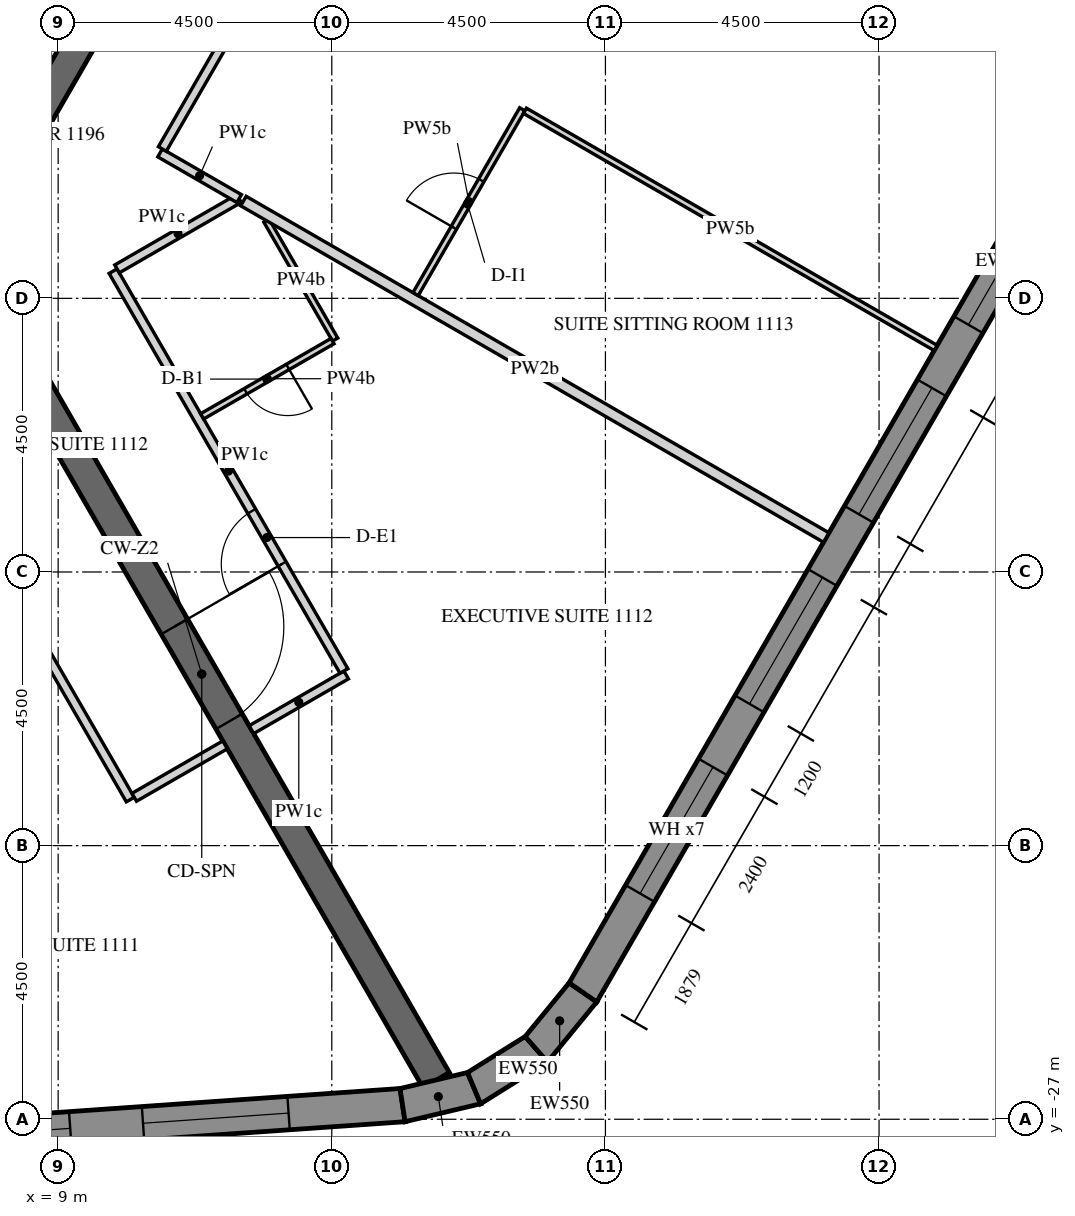
"""IFC4 building model, lengths in metres.
Left out: names, types, materials, properties, quantities, classifications, styles, units other than length and angle.
Written with IfcOpenShell. Run it as: python <this file> out.ifc"""

import sys

from ifc_helpers import new_model, si_unit, direction, frame, frame_2d, origin, place, context, subcontext, project, spatial, polyline, rectangle, outline, extrude, element, fill, save


model = new_model("IFC4")
c1 = context("Model", 3, precision=1e-05, world=origin(), true_north=direction((0.0, 1.0)))
c2 = subcontext(c1, "Body", "Model", "MODEL_VIEW")
j1 = project(units=[si_unit("LENGTHUNIT", "METRE"), si_unit("PLANEANGLEUNIT", "RADIAN")], contexts=[c1])
p1 = place(None, origin())
s1 = spatial("IfcSite", under=j1, at=p1, CompositionType="ELEMENT")
p2 = place(p1, origin())
s2 = spatial("IfcBuilding", under=s1, at=p2, CompositionType="ELEMENT")
p3 = place(p2, frame((0.0, 0.0, 156.6)))
s3 = spatial("IfcBuildingStorey", under=s2, at=p3, CompositionType="ELEMENT", Elevation=156.6)
p4 = place(p3, frame((-13.026, -28.704, -0.15), z_axis=(0.0, 0.0, 1.0), x_axis=(0.99756406806, 0.069756219185, 0.0)))
e1 = element("IfcWall", 1, at=p4, inside=s3, PredefinedType="SOLIDWALL", context=c2, shape_type="SweptSolid", body=[
    extrude(outline(polyline([(-0.026, -0.275), (27.78, -0.275), (27.735, 0.275), (0.026, 0.275), (-0.026, -0.275)])), origin(), (0.0, 0.0, 1.0), 3.9),
])
p5 = place(p4, frame((1.879, 0.0, 1.05)))
e2 = element("IfcOpeningElement", 2, at=p5, cuts=e1, PredefinedType="OPENING", context=c2, shape_type="SweptSolid", body=[
    extrude(rectangle(XDim=2.4, YDim=2.4, at=frame_2d((1.2, 1.2))), frame((0.0, 0.285, 0.0), z_axis=(0.0, -1.0, 0.0), x_axis=(1.0, 0.0, 0.0)), (0.0, 0.0, 1.0), 0.57),
])
p6 = place(p4, frame((5.479, 0.0, 1.05)))
e3 = element("IfcOpeningElement", 3, at=p6, cuts=e1, PredefinedType="OPENING", context=c2, shape_type="SweptSolid", body=[
    extrude(rectangle(XDim=2.4, YDim=2.4, at=frame_2d((1.2, 1.2))), frame((0.0, 0.285, 0.0), z_axis=(0.0, -1.0, 0.0), x_axis=(1.0, 0.0, 0.0)), (0.0, 0.0, 1.0), 0.57),
])
p7 = place(p4, frame((9.079, 0.0, 1.05)))
e4 = element("IfcOpeningElement", 4, at=p7, cuts=e1, PredefinedType="OPENING", context=c2, shape_type="SweptSolid", body=[
    extrude(rectangle(XDim=2.4, YDim=2.4, at=frame_2d((1.2, 1.2))), frame((0.0, 0.285, 0.0), z_axis=(0.0, -1.0, 0.0), x_axis=(1.0, 0.0, 0.0)), (0.0, 0.0, 1.0), 0.57),
])
p8 = place(p4, frame((12.679, 0.0, 1.05)))
e5 = element("IfcOpeningElement", 5, at=p8, cuts=e1, PredefinedType="OPENING", context=c2, shape_type="SweptSolid", body=[
    extrude(rectangle(XDim=2.4, YDim=2.4, at=frame_2d((1.2, 1.2))), frame((0.0, 0.285, 0.0), z_axis=(0.0, -1.0, 0.0), x_axis=(1.0, 0.0, 0.0)), (0.0, 0.0, 1.0), 0.57),
])
p9 = place(p4, frame((16.279, 0.0, 1.05)))
e6 = element("IfcOpeningElement", 6, at=p9, cuts=e1, PredefinedType="OPENING", context=c2, shape_type="SweptSolid", body=[
    extrude(rectangle(XDim=2.4, YDim=2.4, at=frame_2d((1.2, 1.2))), frame((0.0, 0.285, 0.0), z_axis=(0.0, -1.0, 0.0), x_axis=(1.0, 0.0, 0.0)), (0.0, 0.0, 1.0), 0.57),
])
p10 = place(p4, frame((19.879, 0.0, 1.05)))
e7 = element("IfcOpeningElement", 7, at=p10, cuts=e1, PredefinedType="OPENING", context=c2, shape_type="SweptSolid", body=[
    extrude(rectangle(XDim=2.4, YDim=2.4, at=frame_2d((1.2, 1.2))), frame((0.0, 0.285, 0.0), z_axis=(0.0, -1.0, 0.0), x_axis=(1.0, 0.0, 0.0)), (0.0, 0.0, 1.0), 0.57),
])
p11 = place(p4, frame((23.479, 0.0, 1.05)))
e8 = element("IfcOpeningElement", 8, at=p11, cuts=e1, PredefinedType="OPENING", context=c2, shape_type="SweptSolid", body=[
    extrude(rectangle(XDim=2.4, YDim=2.4, at=frame_2d((1.2, 1.2))), frame((0.0, 0.285, 0.0), z_axis=(0.0, -1.0, 0.0), x_axis=(1.0, 0.0, 0.0)), (0.0, 0.0, 1.0), 0.57),
])
p12 = place(p3, frame((14.664, -26.767, -0.15), z_axis=(0.0, 0.0, 1.0), x_axis=(0.973063591128, 0.230536868247, 0.0)))
e9 = element("IfcWall", 9, at=p12, inside=s3, PredefinedType="SOLIDWALL", context=c2, shape_type="SweptSolid", body=[
    extrude(outline(polyline([(-0.022, -0.275), (1.253, -0.275), (1.163, 0.275), (0.022, 0.275), (-0.022, -0.275)])), origin(), (0.0, 0.0, 1.0), 3.9),
])
p13 = place(p3, frame((15.84, -26.489, -0.15), z_axis=(0.0, 0.0, 1.0), x_axis=(0.848009655012, 0.52998077796, 0.0)))
e10 = element("IfcWall", 10, at=p13, inside=s3, PredefinedType="SOLIDWALL", context=c2, shape_type="SweptSolid", body=[
    extrude(outline(polyline([(-0.045, -0.275), (1.253, -0.275), (1.163, 0.275), (0.045, 0.275), (-0.045, -0.275)])), origin(), (0.0, 0.0, 1.0), 3.9),
])
p14 = place(p3, frame((16.864, -25.848, -0.15), z_axis=(0.0, 0.0, 1.0), x_axis=(0.633842757806, 0.773461930787, 0.0)))
e11 = element("IfcWall", 11, at=p14, inside=s3, PredefinedType="SOLIDWALL", context=c2, shape_type="SweptSolid", body=[
    extrude(outline(polyline([(-0.045, -0.275), (1.231, -0.275), (1.186, 0.275), (0.045, 0.275), (-0.045, -0.275)])), origin(), (0.0, 0.0, 1.0), 3.9),
])
p15 = place(p3, frame((17.63, -24.914, -0.15), z_axis=(0.0, 0.0, 1.0), x_axis=(0.499998569178, 0.866026229868, 0.0)))
e12 = element("IfcWall", 12, at=p15, inside=s3, PredefinedType="SOLIDWALL", context=c2, shape_type="SweptSolid", body=[
    extrude(outline(polyline([(-0.022, -0.275), (27.783, -0.275), (27.732, 0.275), (0.022, 0.275), (-0.022, -0.275)])), origin(), (0.0, 0.0, 1.0), 3.9),
])
p16 = place(p15, frame((1.879, 0.0, 1.05)))
e13 = element("IfcOpeningElement", 13, at=p16, cuts=e12, PredefinedType="OPENING", context=c2, shape_type="SweptSolid", body=[
    extrude(rectangle(XDim=2.4, YDim=2.4, at=frame_2d((1.2, 1.2))), frame((0.0, 0.285, 0.0), z_axis=(0.0, -1.0, 0.0), x_axis=(1.0, 0.0, 0.0)), (0.0, 0.0, 1.0), 0.57),
])
p17 = place(p15, frame((5.479, 0.0, 1.05)))
e14 = element("IfcOpeningElement", 14, at=p17, cuts=e12, PredefinedType="OPENING", context=c2, shape_type="SweptSolid", body=[
    extrude(rectangle(XDim=2.4, YDim=2.4, at=frame_2d((1.2, 1.2))), frame((0.0, 0.285, 0.0), z_axis=(0.0, -1.0, 0.0), x_axis=(1.0, 0.0, 0.0)), (0.0, 0.0, 1.0), 0.57),
])
p18 = place(p15, frame((9.079, 0.0, 1.05)))
e15 = element("IfcOpeningElement", 15, at=p18, cuts=e12, PredefinedType="OPENING", context=c2, shape_type="SweptSolid", body=[
    extrude(rectangle(XDim=2.4, YDim=2.4, at=frame_2d((1.2, 1.2))), frame((0.0, 0.285, 0.0), z_axis=(0.0, -1.0, 0.0), x_axis=(1.0, 0.0, 0.0)), (0.0, 0.0, 1.0), 0.57),
])
p19 = place(p15, frame((12.679, 0.0, 1.05)))
e16 = element("IfcOpeningElement", 16, at=p19, cuts=e12, PredefinedType="OPENING", context=c2, shape_type="SweptSolid", body=[
    extrude(rectangle(XDim=2.4, YDim=2.4, at=frame_2d((1.2, 1.2))), frame((0.0, 0.285, 0.0), z_axis=(0.0, -1.0, 0.0), x_axis=(1.0, 0.0, 0.0)), (0.0, 0.0, 1.0), 0.57),
])
p20 = place(p15, frame((16.279, 0.0, 1.05)))
e17 = element("IfcOpeningElement", 17, at=p20, cuts=e12, PredefinedType="OPENING", context=c2, shape_type="SweptSolid", body=[
    extrude(rectangle(XDim=2.4, YDim=2.4, at=frame_2d((1.2, 1.2))), frame((0.0, 0.285, 0.0), z_axis=(0.0, -1.0, 0.0), x_axis=(1.0, 0.0, 0.0)), (0.0, 0.0, 1.0), 0.57),
])
p21 = place(p15, frame((19.879, 0.0, 1.05)))
e18 = element("IfcOpeningElement", 18, at=p21, cuts=e12, PredefinedType="OPENING", context=c2, shape_type="SweptSolid", body=[
    extrude(rectangle(XDim=2.4, YDim=2.4, at=frame_2d((1.2, 1.2))), frame((0.0, 0.285, 0.0), z_axis=(0.0, -1.0, 0.0), x_axis=(1.0, 0.0, 0.0)), (0.0, 0.0, 1.0), 0.57),
])
p22 = place(p15, frame((23.479, 0.0, 1.05)))
e19 = element("IfcOpeningElement", 19, at=p22, cuts=e12, PredefinedType="OPENING", context=c2, shape_type="SweptSolid", body=[
    extrude(rectangle(XDim=2.4, YDim=2.4, at=frame_2d((1.2, 1.2))), frame((0.0, 0.285, 0.0), z_axis=(0.0, -1.0, 0.0), x_axis=(1.0, 0.0, 0.0)), (0.0, 0.0, 1.0), 0.57),
])
p23 = place(p3, frame((7.361, -12.75, -0.15), z_axis=(0.0, 0.0, 1.0), x_axis=(0.50000571537, 0.866022103989, 0.0)))
e20 = element("IfcWall", 20, at=p23, inside=s3, PredefinedType="SHEAR", context=c2, shape_type="SweptSolid", body=[
    extrude(outline(polyline([(-0.144, -0.25), (14.867, -0.25), (14.578, 0.25), (0.144, 0.25), (-0.144, -0.25)])), origin(), (0.0, 0.0, 1.0), 3.9),
])
p24 = place(p23, frame((6.49, 0.0, 0.15)))
e21 = element("IfcOpeningElement", 21, at=p24, cuts=e20, PredefinedType="OPENING", context=c2, shape_type="SweptSolid", body=[
    extrude(rectangle(XDim=1.8, YDim=2.4, at=frame_2d((0.9, 1.2))), frame((0.0, 0.26, 0.0), z_axis=(0.0, -1.0, 0.0), x_axis=(1.0, 0.0, 0.0)), (0.0, 0.0, 1.0), 0.52),
])
p25 = place(p3, frame((7.506, -13.0, -0.15), z_axis=(0.0, 0.0, 1.0), x_axis=(0.499988271576, -0.866032175087, 0.0)))
e22 = element("IfcWall", 22, at=p25, inside=s3, PredefinedType="SHEAR", context=c2, shape_type="SweptSolid", body=[
    extrude(rectangle(XDim=15.424, YDim=0.5, at=frame_2d((7.712, 0.0))), origin(), (0.0, 0.0, 1.0), 3.9),
])
p26 = place(p25, frame((6.812, 0.0, 0.15)))
e23 = element("IfcOpeningElement", 23, at=p26, cuts=e22, PredefinedType="OPENING", context=c2, shape_type="SweptSolid", body=[
    extrude(rectangle(XDim=1.8, YDim=2.4, at=frame_2d((0.9, 1.2))), frame((0.0, 0.26, 0.0), z_axis=(0.0, -1.0, 0.0), x_axis=(1.0, 0.0, 0.0)), (0.0, 0.0, 1.0), 0.52),
])
p27 = place(p3, frame((5.673, -9.825, -0.15), z_axis=(0.0, 0.0, 1.0), x_axis=(0.499995046907, 0.866028263435, 0.0)))
e24 = element("IfcWall", 24, at=p27, inside=s3, PredefinedType="SHEAR", context=c2, shape_type="SweptSolid", body=[
    extrude(outline(polyline([(-0.101, -0.175), (11.446, -0.175), (11.244, 0.175), (0.101, 0.175), (-0.101, -0.175)])), origin(), (0.0, 0.0, 1.0), 3.9),
])
p28 = place(p27, frame((4.801, 0.0, 0.15)))
e25 = element("IfcOpeningElement", 25, at=p28, cuts=e24, PredefinedType="OPENING", context=c2, shape_type="SweptSolid", body=[
    extrude(rectangle(XDim=1.8, YDim=2.4, at=frame_2d((0.9, 1.2))), frame((0.0, 0.185, 0.0), z_axis=(0.0, -1.0, 0.0), x_axis=(1.0, 0.0, 0.0)), (0.0, 0.0, 1.0), 0.37),
])
p29 = place(p3, frame((6.178, -14.8, 0.0), z_axis=(0.0, 0.0, 1.0), x_axis=(0.499984309814, -0.866034462328, 0.0)))
e26 = element("IfcWall", 26, at=p29, inside=s3, PredefinedType="PARTITIONING", context=c2, shape_type="SweptSolid", body=[
    extrude(rectangle(XDim=8.017, YDim=0.15, at=frame_2d((4.008, 0.0))), origin(), (0.0, 0.0, 1.0), 2.823),
])
p30 = place(p3, frame((10.251, -21.705, 0.0), z_axis=(0.0, 0.0, 1.0), x_axis=(0.866013532718, 0.500020560727, 0.0)))
e27 = element("IfcWall", 27, at=p30, inside=s3, PredefinedType="PARTITIONING", context=c2, shape_type="SweptSolid", body=[
    extrude(rectangle(XDim=1.725, YDim=0.15, at=frame_2d((0.863, 0.0))), origin(), (0.0, 0.0, 1.0), 2.823),
])
p31 = place(p3, frame((12.178, -20.593, 0.0), z_axis=(0.0, 0.0, 1.0), x_axis=(0.866047807691, 0.499961193289, 0.0)))
e28 = element("IfcWall", 28, at=p31, inside=s3, PredefinedType="PARTITIONING", context=c2, shape_type="SweptSolid", body=[
    extrude(rectangle(XDim=1.8, YDim=0.15, at=frame_2d((0.9, 0.0))), origin(), (0.0, 0.0, 1.0), 2.823),
])
p32 = place(p3, frame((13.699, -19.628, 0.0), z_axis=(0.0, 0.0, 1.0), x_axis=(-0.499998968938, 0.866025999068, 0.0)))
e29 = element("IfcWall", 29, at=p32, inside=s3, PredefinedType="PARTITIONING", context=c2, shape_type="SweptSolid", body=[
    extrude(rectangle(XDim=7.592, YDim=0.15, at=frame_2d((3.796, 0.0))), origin(), (0.0, 0.0, 1.0), 2.823),
])
p33 = place(p32, frame((2.033, 0.0, 0.0)))
e30 = element("IfcOpeningElement", 30, at=p33, cuts=e29, PredefinedType="OPENING", context=c2, shape_type="SweptSolid", body=[
    extrude(rectangle(XDim=1.0, YDim=2.1, at=frame_2d((0.5, 1.05))), frame((0.0, 0.085, 0.0), z_axis=(0.0, -1.0, 0.0), x_axis=(1.0, 0.0, 0.0)), (0.0, 0.0, 1.0), 0.17),
])
p34 = place(p3, frame((9.968, -13.016, 0.0), z_axis=(0.0, 0.0, 1.0), x_axis=(0.866022320763, 0.500005339912, 0.0)))
e31 = element("IfcWall", 31, at=p34, inside=s3, PredefinedType="PARTITIONING", context=c2, shape_type="SweptSolid", body=[
    extrude(rectangle(XDim=2.316, YDim=0.15, at=frame_2d((1.158, 0.0))), origin(), (0.0, 0.0, 1.0), 2.823),
])
p35 = place(p3, frame((11.977, -11.859, 0.0), z_axis=(0.0, 0.0, 1.0), x_axis=(-0.865993364801, 0.500055489042, 0.0)))
e32 = element("IfcWall", 32, at=p35, inside=s3, PredefinedType="PARTITIONING", context=c2, shape_type="SweptSolid", body=[
    extrude(rectangle(XDim=1.502, YDim=0.15, at=frame_2d((0.751, 0.0))), origin(), (0.0, 0.0, 1.0), 2.823),
])
p36 = place(p3, frame((10.714, -11.043, 0.0), z_axis=(0.0, 0.0, 1.0), x_axis=(0.500001980452, 0.866024260367, 0.0)))
e33 = element("IfcWall", 33, at=p36, inside=s3, PredefinedType="PARTITIONING", context=c2, shape_type="SweptSolid", body=[
    extrude(rectangle(XDim=12.752, YDim=0.15, at=frame_2d((6.376, 0.0))), origin(), (0.0, 0.0, 1.0), 2.823),
])
p37 = place(p36, frame((3.625, 0.0, 0.0)))
e34 = element("IfcOpeningElement", 34, at=p37, cuts=e33, PredefinedType="OPENING", context=c2, shape_type="SweptSolid", body=[
    extrude(rectangle(XDim=1.0, YDim=2.1, at=frame_2d((0.5, 1.05))), frame((0.0, 0.085, 0.0), z_axis=(0.0, -1.0, 0.0), x_axis=(1.0, 0.0, 0.0)), (0.0, 0.0, 1.0), 0.17),
])
p38 = place(p36, frame((11.602, 0.0, 0.0)))
e35 = element("IfcOpeningElement", 35, at=p38, cuts=e33, PredefinedType="OPENING", context=c2, shape_type="SweptSolid", body=[
    extrude(rectangle(XDim=1.0, YDim=2.1, at=frame_2d((0.5, 1.05))), frame((0.0, 0.085, 0.0), z_axis=(0.0, -1.0, 0.0), x_axis=(1.0, 0.0, 0.0)), (0.0, 0.0, 1.0), 0.17),
])
p39 = place(p3, frame((12.426, -12.223, 0.0), z_axis=(0.0, 0.0, 1.0), x_axis=(0.499919032186, -0.866072145528, 0.0)))
e36 = element("IfcWall", 36, at=p39, inside=s3, PredefinedType="PARTITIONING", context=c2, shape_type="SweptSolid", body=[
    extrude(rectangle(XDim=2.258, YDim=0.1, at=frame_2d((1.129, 0.0))), origin(), (0.0, 0.0, 1.0), 2.823),
])
p40 = place(p3, frame((13.512, -14.203, 0.0), z_axis=(0.0, 0.0, 1.0), x_axis=(-0.866006523861, -0.500032699561, 0.0)))
e37 = element("IfcWall", 37, at=p40, inside=s3, PredefinedType="PARTITIONING", context=c2, shape_type="SweptSolid", body=[
    extrude(rectangle(XDim=2.475, YDim=0.1, at=frame_2d((1.237, 0.0))), origin(), (0.0, 0.0, 1.0), 2.823),
])
p41 = place(p40, frame((0.85, 0.0, 0.0)))
e38 = element("IfcOpeningElement", 38, at=p41, cuts=e37, PredefinedType="OPENING", context=c2, shape_type="SweptSolid", body=[
    extrude(rectangle(XDim=0.8, YDim=2.1, at=frame_2d((0.4, 1.05))), frame((0.0, 0.06, 0.0), z_axis=(0.0, -1.0, 0.0), x_axis=(1.0, 0.0, 0.0)), (0.0, 0.0, 1.0), 0.12),
])
p42 = place(p3, frame((21.631, -17.433, 0.0), z_axis=(0.0, 0.0, 1.0), x_axis=(-0.866031296205, 0.499989793889, 0.0)))
e39 = element("IfcWall", 39, at=p42, inside=s3, PredefinedType="PARTITIONING", context=c2, shape_type="SweptSolid", body=[
    extrude(rectangle(XDim=11.067, YDim=0.18, at=frame_2d((5.534, 0.0))), origin(), (0.0, 0.0, 1.0), 2.823),
])
p43 = place(p3, frame((14.878, -13.43, 0.0), z_axis=(0.0, 0.0, 1.0), x_axis=(0.500021481416, 0.866013001128, 0.0)))
e40 = element("IfcWall", 40, at=p43, inside=s3, PredefinedType="PARTITIONING", context=c2, shape_type="SweptSolid", body=[
    extrude(rectangle(XDim=3.51, YDim=0.1, at=frame_2d((1.755, 0.0))), origin(), (0.0, 0.0, 1.0), 2.823),
])
p44 = place(p43, frame((1.26, 0.0, 0.0)))
e41 = element("IfcOpeningElement", 41, at=p44, cuts=e40, PredefinedType="OPENING", context=c2, shape_type="SweptSolid", body=[
    extrude(rectangle(XDim=0.9, YDim=2.1, at=frame_2d((0.45, 1.05))), frame((0.0, 0.06, 0.0), z_axis=(0.0, -1.0, 0.0), x_axis=(1.0, 0.0, 0.0)), (0.0, 0.0, 1.0), 0.12),
])
p45 = place(p3, frame((16.676, -10.416, 0.0), z_axis=(0.0, 0.0, 1.0), x_axis=(0.866034953203, -0.499983459557, 0.0)))
e42 = element("IfcWall", 42, at=p45, inside=s3, PredefinedType="PARTITIONING", context=c2, shape_type="SweptSolid", body=[
    extrude(rectangle(XDim=7.8, YDim=0.1, at=frame_2d((3.9, 0.0))), origin(), (0.0, 0.0, 1.0), 2.823),
])
p46 = place(p10, frame((0.0, 0.205, 0.0)))
e43 = element("IfcWindow", 43, at=p46, inside=s3, PartitioningType="DOUBLE_PANEL_VERTICAL", PredefinedType="WINDOW", context=c2, shape_type="SweptSolid", body=[
    extrude(rectangle(XDim=2.4, YDim=2.4, at=frame_2d((1.2, 1.2))), frame((0.0, 0.03, 0.0), z_axis=(0.0, -1.0, 0.0), x_axis=(1.0, 0.0, 0.0)), (0.0, 0.0, 1.0), 0.06),
])
fill(e7, e43)
p47 = place(p11, frame((0.0, 0.205, 0.0)))
e44 = element("IfcWindow", 44, at=p47, inside=s3, PartitioningType="DOUBLE_PANEL_VERTICAL", PredefinedType="WINDOW", context=c2, shape_type="SweptSolid", body=[
    extrude(rectangle(XDim=2.4, YDim=2.4, at=frame_2d((1.2, 1.2))), frame((0.0, 0.03, 0.0), z_axis=(0.0, -1.0, 0.0), x_axis=(1.0, 0.0, 0.0)), (0.0, 0.0, 1.0), 0.06),
])
fill(e8, e44)
p48 = place(p16, frame((0.0, 0.205, 0.0)))
e45 = element("IfcWindow", 45, at=p48, inside=s3, PartitioningType="DOUBLE_PANEL_VERTICAL", PredefinedType="WINDOW", context=c2, shape_type="SweptSolid", body=[
    extrude(rectangle(XDim=2.4, YDim=2.4, at=frame_2d((1.2, 1.2))), frame((0.0, 0.03, 0.0), z_axis=(0.0, -1.0, 0.0), x_axis=(1.0, 0.0, 0.0)), (0.0, 0.0, 1.0), 0.06),
])
fill(e13, e45)
p49 = place(p17, frame((0.0, 0.205, 0.0)))
e46 = element("IfcWindow", 46, at=p49, inside=s3, PartitioningType="DOUBLE_PANEL_VERTICAL", PredefinedType="WINDOW", context=c2, shape_type="SweptSolid", body=[
    extrude(rectangle(XDim=2.4, YDim=2.4, at=frame_2d((1.2, 1.2))), frame((0.0, 0.03, 0.0), z_axis=(0.0, -1.0, 0.0), x_axis=(1.0, 0.0, 0.0)), (0.0, 0.0, 1.0), 0.06),
])
fill(e14, e46)
p50 = place(p18, frame((0.0, 0.205, 0.0)))
e47 = element("IfcWindow", 47, at=p50, inside=s3, PartitioningType="DOUBLE_PANEL_VERTICAL", PredefinedType="WINDOW", context=c2, shape_type="SweptSolid", body=[
    extrude(rectangle(XDim=2.4, YDim=2.4, at=frame_2d((1.2, 1.2))), frame((0.0, 0.03, 0.0), z_axis=(0.0, -1.0, 0.0), x_axis=(1.0, 0.0, 0.0)), (0.0, 0.0, 1.0), 0.06),
])
fill(e15, e47)
p51 = place(p19, frame((0.0, 0.205, 0.0)))
e48 = element("IfcWindow", 48, at=p51, inside=s3, PartitioningType="DOUBLE_PANEL_VERTICAL", PredefinedType="WINDOW", context=c2, shape_type="SweptSolid", body=[
    extrude(rectangle(XDim=2.4, YDim=2.4, at=frame_2d((1.2, 1.2))), frame((0.0, 0.03, 0.0), z_axis=(0.0, -1.0, 0.0), x_axis=(1.0, 0.0, 0.0)), (0.0, 0.0, 1.0), 0.06),
])
fill(e16, e48)
p52 = place(p26, origin())
e49 = element("IfcDoor", 49, at=p52, inside=s3, OperationType="DOUBLE_DOOR_SINGLE_SWING", PredefinedType="DOOR", context=c2, shape_type="SweptSolid", body=[
    extrude(rectangle(XDim=1.8, YDim=2.4, at=frame_2d((0.9, 1.2))), frame((0.0, 0.025, 0.0), z_axis=(0.0, -1.0, 0.0), x_axis=(1.0, 0.0, 0.0)), (0.0, 0.0, 1.0), 0.05),
])
fill(e23, e49)
p53 = place(p33, origin())
e50 = element("IfcDoor", 50, at=p53, inside=s3, OperationType="SINGLE_SWING_LEFT", PredefinedType="DOOR", context=c2, shape_type="SweptSolid", body=[
    extrude(rectangle(XDim=1.0, YDim=2.1, at=frame_2d((0.5, 1.05))), frame((0.0, 0.025, 0.0), z_axis=(0.0, -1.0, 0.0), x_axis=(1.0, 0.0, 0.0)), (0.0, 0.0, 1.0), 0.05),
])
fill(e30, e50)
p54 = place(p41, origin())
e51 = element("IfcDoor", 51, at=p54, inside=s3, OperationType="SINGLE_SWING_RIGHT", PredefinedType="DOOR", context=c2, shape_type="SweptSolid", body=[
    extrude(rectangle(XDim=0.8, YDim=2.1, at=frame_2d((0.4, 1.05))), frame((0.0, 0.025, 0.0), z_axis=(0.0, -1.0, 0.0), x_axis=(1.0, 0.0, 0.0)), (0.0, 0.0, 1.0), 0.05),
])
fill(e38, e51)
p55 = place(p44, origin())
e52 = element("IfcDoor", 52, at=p55, inside=s3, OperationType="SINGLE_SWING_RIGHT", PredefinedType="DOOR", context=c2, shape_type="SweptSolid", body=[
    extrude(rectangle(XDim=0.9, YDim=2.1, at=frame_2d((0.45, 1.05))), frame((0.0, 0.025, 0.0), z_axis=(0.0, -1.0, 0.0), x_axis=(1.0, 0.0, 0.0)), (0.0, 0.0, 1.0), 0.05),
])
fill(e41, e52)
save(model, sys.argv[1])
